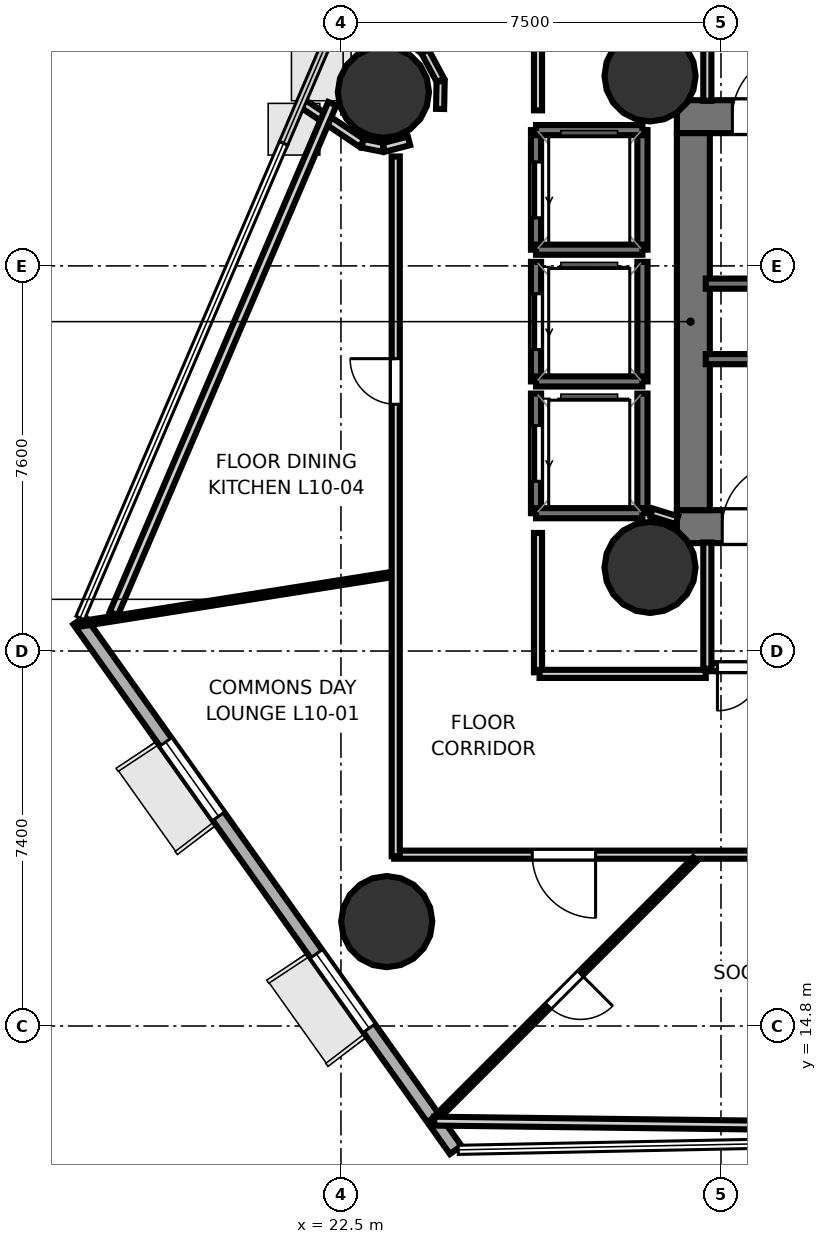
"""IFC4 building model, lengths in metres.
Left out: names, types, materials, properties, quantities, classifications, styles, units other than length and angle.
Written with IfcOpenShell. Run it as: python <this file> out.ifc"""

import sys

from ifc_helpers import new_model, si_unit, direction, frame, frame_2d, origin, origin_2d, place, context, subcontext, project, spatial, rectangle, hollow_circle, extrude, element, fill, save


model = new_model("IFC4")
c1 = context("Model", 3, precision=1e-05, world=origin(), true_north=direction((0.0, 1.0)))
c2 = subcontext(c1, "Body", "Model", "MODEL_VIEW")
j1 = project(units=[si_unit("LENGTHUNIT", "METRE"), si_unit("PLANEANGLEUNIT", "RADIAN")], contexts=[c1])
p1 = place(None, origin())
s1 = spatial("IfcSite", under=j1, at=p1, CompositionType="ELEMENT")
p2 = place(p1, origin())
s2 = spatial("IfcBuilding", under=s1, at=p2, CompositionType="ELEMENT")
p3 = place(p2, frame((0.0, 0.0, 44.2)))
s3 = spatial("IfcBuildingStorey", under=s2, at=p3, CompositionType="ELEMENT", Elevation=44.2)
p4 = place(p3, frame((29.13, 32.745, 0.0), z_axis=(0.0, 0.0, 1.0), x_axis=(1.0, 0.0, 0.0)))
e1 = element("IfcWall", 1, at=p4, inside=s3, PredefinedType="SHEAR", context=c2, shape_type="SweptSolid", body=[
    extrude(rectangle(XDim=10.72, YDim=0.65, at=frame_2d((5.36, 0.0))), origin(), (0.0, 0.0, 1.0), 3.4),
])
p5 = place(p4, frame((1.095, 0.0, 0.0)))
e2 = element("IfcOpeningElement", 2, at=p5, cuts=e1, PredefinedType="OPENING", context=c2, shape_type="SweptSolid", body=[
    extrude(rectangle(XDim=1.25, YDim=2.15, at=frame_2d((0.625, 1.075))), frame((0.0, 0.335, 0.0), z_axis=(0.0, -1.0, 0.0), x_axis=(1.0, 0.0, 0.0)), (0.0, 0.0, 1.0), 0.67),
])
p6 = place(p3, frame((29.13, 24.655, 0.0), z_axis=(0.0, 0.0, 1.0), x_axis=(1.0, 0.0, 0.0)))
e3 = element("IfcWall", 3, at=p6, inside=s3, PredefinedType="SHEAR", context=c2, shape_type="SweptSolid", body=[
    extrude(rectangle(XDim=10.72, YDim=0.65, at=frame_2d((5.36, 0.0))), origin(), (0.0, 0.0, 1.0), 3.4),
])
p7 = place(p6, frame((0.895, 0.0, 0.0)))
e4 = element("IfcOpeningElement", 4, at=p7, cuts=e3, PredefinedType="OPENING", context=c2, shape_type="SweptSolid", body=[
    extrude(rectangle(XDim=1.25, YDim=2.15, at=frame_2d((0.625, 1.075))), frame((0.0, 0.335, 0.0), z_axis=(0.0, -1.0, 0.0), x_axis=(1.0, 0.0, 0.0)), (0.0, 0.0, 1.0), 0.67),
])
p8 = place(p3, frame((29.455, 24.98, 0.0), z_axis=(0.0, 0.0, 1.0), x_axis=(0.0, 1.0, 0.0)))
e5 = element("IfcWall", 5, at=p8, inside=s3, PredefinedType="SHEAR", context=c2, shape_type="SweptSolid", body=[
    extrude(rectangle(XDim=7.44, YDim=0.65, at=frame_2d((3.72, 0.0))), origin(), (0.0, 0.0, 1.0), 3.4),
])
for number, where, z_axis, x_axis in (
    (6, (28.6, 33.55, 0.0), (0.0, 0.0, 1.0), (1.0, 0.0, 0.0)),
    (7, (28.6, 23.85, 0.0), (0.0, 0.0, 1.0), (1.0, 0.0, 0.0)),
    (8, (23.338, 33.228, 0.0), (0.0, 0.0, 1.0), (1.0, 0.0, 0.0)),
    (9, (23.404, 16.86, 0.0), (0.0, 0.0, 1.0), (1.0, 0.0, 0.0)),
):
    element("IfcColumn", number, at=place(p3, frame(where, z_axis=z_axis, x_axis=x_axis)), inside=s3, PredefinedType="COLUMN", context=c2, shape_type="SweptSolid", body=[
        extrude(hollow_circle(Radius=0.9, WallThickness=0.045, at=origin_2d()), origin(), (0.0, 0.0, 1.0), 3.7),
    ])
p9 = place(p3, frame((17.333, 22.807, 0.0), z_axis=(0.0, 0.0, 1.0), x_axis=(0.579477425236, -0.814988290494, 0.0)))
e10 = element("IfcWall", 10, at=p9, inside=s3, PredefinedType="SOLIDWALL", context=c2, shape_type="SweptSolid", body=[
    extrude(rectangle(XDim=12.824, YDim=0.28, at=frame_2d((6.412, 0.0))), origin(), (0.0, 0.0, 1.0), 3.4),
])
p10 = place(p9, frame((2.947, 0.0, 0.85)))
e11 = element("IfcOpeningElement", 11, at=p10, cuts=e10, PredefinedType="OPENING", context=c2, shape_type="SweptSolid", body=[
    extrude(rectangle(XDim=1.8, YDim=2.1, at=frame_2d((0.9, 1.05))), frame((0.0, 0.15, 0.0), z_axis=(0.0, -1.0, 0.0), x_axis=(1.0, 0.0, 0.0)), (0.0, 0.0, 1.0), 0.3),
])
p11 = place(p9, frame((8.077, 0.0, 0.85)))
e12 = element("IfcOpeningElement", 12, at=p11, cuts=e10, PredefinedType="OPENING", context=c2, shape_type="SweptSolid", body=[
    extrude(rectangle(XDim=1.8, YDim=2.1, at=frame_2d((0.9, 1.05))), frame((0.0, 0.15, 0.0), z_axis=(0.0, -1.0, 0.0), x_axis=(1.0, 0.0, 0.0)), (0.0, 0.0, 1.0), 0.3),
])
p12 = place(p3, frame((29.7, 29.45, 0.0), z_axis=(0.0, 0.0, 1.0), x_axis=(1.0, 0.0, 0.0)))
e13 = element("IfcWall", 13, at=p12, inside=s3, PredefinedType="SOLIDWALL", context=c2, shape_type="SweptSolid", body=[
    extrude(rectangle(XDim=8.3, YDim=0.2, at=frame_2d((4.15, 0.0))), origin(), (0.0, 0.0, 1.0), 3.4),
])
p13 = place(p3, frame((29.7, 27.96, 0.0), z_axis=(0.0, 0.0, 1.0), x_axis=(1.0, 0.0, 0.0)))
e14 = element("IfcWall", 14, at=p13, inside=s3, PredefinedType="SOLIDWALL", context=c2, shape_type="SweptSolid", body=[
    extrude(rectangle(XDim=7.75, YDim=0.2, at=frame_2d((3.875, 0.0))), origin(), (0.0, 0.0, 1.0), 3.4),
])
p14 = place(p3, frame((28.45, 30.12, 0.0), z_axis=(0.0, 0.0, 1.0), x_axis=(0.0, 1.0, 0.0)))
e15 = element("IfcWall", 15, at=p14, inside=s3, PredefinedType="SOLIDWALL", context=c2, shape_type="SweptSolid", body=[
    extrude(rectangle(XDim=2.36, YDim=0.2, at=frame_2d((1.18, 0.0))), origin(), (0.0, 0.0, 1.0), 3.4),
])
p15 = place(p3, frame((26.35, 30.12, 0.0), z_axis=(0.0, 0.0, 1.0), x_axis=(0.0, 1.0, 0.0)))
e16 = element("IfcWall", 16, at=p15, inside=s3, PredefinedType="SOLIDWALL", context=c2, shape_type="SweptSolid", body=[
    extrude(rectangle(XDim=2.36, YDim=0.2, at=frame_2d((1.18, 0.0))), origin(), (0.0, 0.0, 1.0), 3.4),
])
p16 = place(p15, frame((0.63, 0.0, 0.0)))
e17 = element("IfcOpeningElement", 17, at=p16, cuts=e16, PredefinedType="OPENING", context=c2, shape_type="SweptSolid", body=[
    extrude(rectangle(XDim=1.1, YDim=2.15, at=frame_2d((0.55, 1.075))), frame((0.0, 0.11, 0.0), z_axis=(0.0, -1.0, 0.0), x_axis=(1.0, 0.0, 0.0)), (0.0, 0.0, 1.0), 0.22),
])
for number, where, z_axis, x_axis in (
    (18, (26.35, 32.48, 0.0), (0.0, 0.0, 1.0), (1.0, 0.0, 0.0)),
    (19, (26.35, 30.12, 0.0), (0.0, 0.0, 1.0), (1.0, 0.0, 0.0)),
):
    element("IfcWall", number, at=place(p3, frame(where, z_axis=z_axis, x_axis=x_axis)), inside=s3, PredefinedType="SOLIDWALL", context=c2, shape_type="SweptSolid", body=[
        extrude(rectangle(XDim=2.1, YDim=0.2, at=frame_2d((1.05, 0.0))), origin(), (0.0, 0.0, 1.0), 3.4),
    ])
p17 = place(p3, frame((28.45, 27.52, 0.0), z_axis=(0.0, 0.0, 1.0), x_axis=(0.0, 1.0, 0.0)))
e20 = element("IfcWall", 20, at=p17, inside=s3, PredefinedType="SOLIDWALL", context=c2, shape_type="SweptSolid", body=[
    extrude(rectangle(XDim=2.36, YDim=0.2, at=frame_2d((1.18, 0.0))), origin(), (0.0, 0.0, 1.0), 3.4),
])
p18 = place(p3, frame((26.35, 27.52, 0.0), z_axis=(0.0, 0.0, 1.0), x_axis=(0.0, 1.0, 0.0)))
e21 = element("IfcWall", 21, at=p18, inside=s3, PredefinedType="SOLIDWALL", context=c2, shape_type="SweptSolid", body=[
    extrude(rectangle(XDim=2.36, YDim=0.2, at=frame_2d((1.18, 0.0))), origin(), (0.0, 0.0, 1.0), 3.4),
])
p19 = place(p18, frame((0.63, 0.0, 0.0)))
e22 = element("IfcOpeningElement", 22, at=p19, cuts=e21, PredefinedType="OPENING", context=c2, shape_type="SweptSolid", body=[
    extrude(rectangle(XDim=1.1, YDim=2.15, at=frame_2d((0.55, 1.075))), frame((0.0, 0.11, 0.0), z_axis=(0.0, -1.0, 0.0), x_axis=(1.0, 0.0, 0.0)), (0.0, 0.0, 1.0), 0.22),
])
p20 = place(p3, frame((26.35, 27.52, 0.0), z_axis=(0.0, 0.0, 1.0), x_axis=(1.0, 0.0, 0.0)))
e23 = element("IfcWall", 23, at=p20, inside=s3, PredefinedType="SOLIDWALL", context=c2, shape_type="SweptSolid", body=[
    extrude(rectangle(XDim=2.1, YDim=0.2, at=frame_2d((1.05, 0.0))), origin(), (0.0, 0.0, 1.0), 3.4),
])
p21 = place(p3, frame((28.45, 24.92, 0.0), z_axis=(0.0, 0.0, 1.0), x_axis=(0.0, 1.0, 0.0)))
e24 = element("IfcWall", 24, at=p21, inside=s3, PredefinedType="SOLIDWALL", context=c2, shape_type="SweptSolid", body=[
    extrude(rectangle(XDim=2.36, YDim=0.2, at=frame_2d((1.18, 0.0))), origin(), (0.0, 0.0, 1.0), 3.4),
])
p22 = place(p3, frame((26.35, 24.92, 0.0), z_axis=(0.0, 0.0, 1.0), x_axis=(0.0, 1.0, 0.0)))
e25 = element("IfcWall", 25, at=p22, inside=s3, PredefinedType="SOLIDWALL", context=c2, shape_type="SweptSolid", body=[
    extrude(rectangle(XDim=2.36, YDim=0.2, at=frame_2d((1.18, 0.0))), origin(), (0.0, 0.0, 1.0), 3.4),
])
p23 = place(p22, frame((0.63, 0.0, 0.0)))
e26 = element("IfcOpeningElement", 26, at=p23, cuts=e25, PredefinedType="OPENING", context=c2, shape_type="SweptSolid", body=[
    extrude(rectangle(XDim=1.1, YDim=2.15, at=frame_2d((0.55, 1.075))), frame((0.0, 0.11, 0.0), z_axis=(0.0, -1.0, 0.0), x_axis=(1.0, 0.0, 0.0)), (0.0, 0.0, 1.0), 0.22),
])
p24 = place(p3, frame((26.35, 24.92, 0.0), z_axis=(0.0, 0.0, 1.0), x_axis=(1.0, 0.0, 0.0)))
e27 = element("IfcWall", 27, at=p24, inside=s3, PredefinedType="SOLIDWALL", context=c2, shape_type="SweptSolid", body=[
    extrude(rectangle(XDim=2.1, YDim=0.2, at=frame_2d((1.05, 0.0))), origin(), (0.0, 0.0, 1.0), 3.4),
])
p25 = place(p3, frame((29.731, 33.058, 0.0), z_axis=(0.0, 0.0, 1.0), x_axis=(0.0, 1.0, 0.0)))
e28 = element("IfcWall", 28, at=p25, inside=s3, PredefinedType="PARTITIONING", context=c2, shape_type="SweptSolid", body=[
    extrude(rectangle(XDim=2.462, YDim=0.16, at=frame_2d((1.231, 0.0))), origin(), (0.0, 0.0, 1.0), 2.72),
])
p26 = place(p3, frame((33.45, 21.881, 0.0), z_axis=(0.0, 0.0, 1.0), x_axis=(-1.0, 0.0, 0.0)))
e29 = element("IfcWall", 29, at=p26, inside=s3, PredefinedType="PARTITIONING", context=c2, shape_type="SweptSolid", body=[
    extrude(rectangle(XDim=3.75, YDim=0.16, at=frame_2d((1.875, 0.0))), origin(), (0.0, 0.0, 1.0), 2.72),
])
p27 = place(p26, frame((1.275, 0.0, 0.0)))
e30 = element("IfcOpeningElement", 30, at=p27, cuts=e29, PredefinedType="OPENING", context=c2, shape_type="SweptSolid", body=[
    extrude(rectangle(XDim=1.2, YDim=2.15, at=frame_2d((0.6, 1.075))), frame((0.0, 0.09, 0.0), z_axis=(0.0, -1.0, 0.0), x_axis=(1.0, 0.0, 0.0)), (0.0, 0.0, 1.0), 0.18),
])
p28 = place(p26, frame((2.66, 0.0, 0.0)))
e31 = element("IfcOpeningElement", 31, at=p28, cuts=e29, PredefinedType="OPENING", context=c2, shape_type="SweptSolid", body=[
    extrude(rectangle(XDim=0.86, YDim=2.05, at=frame_2d((0.43, 1.025))), frame((0.0, 0.09, 0.0), z_axis=(0.0, -1.0, 0.0), x_axis=(1.0, 0.0, 0.0)), (0.0, 0.0, 1.0), 0.18),
])
p29 = place(p3, frame((29.731, 21.85, 0.0), z_axis=(0.0, 0.0, 1.0), x_axis=(0.0, 1.0, 0.0)))
e32 = element("IfcWall", 32, at=p29, inside=s3, PredefinedType="PARTITIONING", context=c2, shape_type="SweptSolid", body=[
    extrude(rectangle(XDim=2.492, YDim=0.16, at=frame_2d((1.246, 0.0))), origin(), (0.0, 0.0, 1.0), 2.72),
])
p30 = place(p3, frame((29.13, 24.782, 0.0), z_axis=(0.0, 0.0, 1.0), x_axis=(-0.955000482512, 0.296604245422, 0.0)))
e33 = element("IfcWall", 33, at=p30, inside=s3, PredefinedType="PARTITIONING", context=c2, shape_type="SweptSolid", body=[
    extrude(rectangle(XDim=0.524, YDim=0.16, at=frame_2d((0.262, 0.0))), origin(), (0.0, 0.0, 1.0), 2.72),
])
p31 = place(p3, frame((24.464, 33.461, 0.0), z_axis=(0.0, 0.0, 1.0), x_axis=(-0.4715232649, 0.881853622014, 0.0)))
e34 = element("IfcWall", 34, at=p31, inside=s3, PredefinedType="PARTITIONING", context=c2, shape_type="SweptSolid", body=[
    extrude(rectangle(XDim=0.65, YDim=0.16, at=frame_2d((0.325, 0.0))), origin(), (0.0, 0.0, 1.0), 2.678),
])
p32 = place(p3, frame((24.15, 34.044, 0.0), z_axis=(0.0, 0.0, 1.0), x_axis=(-0.773051152653, 0.634343688691, 0.0)))
e35 = element("IfcWall", 35, at=p32, inside=s3, PredefinedType="PARTITIONING", context=c2, shape_type="SweptSolid", body=[
    extrude(rectangle(XDim=1.934, YDim=0.16, at=frame_2d((0.967, 0.0))), origin(), (0.0, 0.0, 1.0), 2.678),
])
p33 = place(p3, frame((26.389, 35.58, 0.0), z_axis=(0.0, 0.0, 1.0), x_axis=(0.0, -1.0, 0.0)))
e36 = element("IfcWall", 36, at=p33, inside=s3, PredefinedType="PARTITIONING", context=c2, shape_type="SweptSolid", body=[
    extrude(rectangle(XDim=2.71, YDim=0.16, at=frame_2d((1.355, 0.0))), origin(), (0.0, 0.0, 1.0), 2.678),
])
p34 = place(p3, frame((26.389, 24.531, 0.0), z_axis=(0.0, 0.0, 1.0), x_axis=(0.0, -1.0, 0.0)))
e37 = element("IfcWall", 37, at=p34, inside=s3, PredefinedType="PARTITIONING", context=c2, shape_type="SweptSolid", body=[
    extrude(rectangle(XDim=2.75, YDim=0.16, at=frame_2d((1.375, 0.0))), origin(), (0.0, 0.0, 1.0), 2.72),
])
p35 = place(p3, frame((26.42, 21.749, 0.0), z_axis=(0.0, 0.0, 1.0), x_axis=(1.0, 0.0, 0.0)))
e38 = element("IfcWall", 38, at=p35, inside=s3, PredefinedType="PARTITIONING", context=c2, shape_type="SweptSolid", body=[
    extrude(rectangle(XDim=3.28, YDim=0.16, at=frame_2d((1.64, 0.0))), origin(), (0.0, 0.0, 1.0), 2.72),
])
p36 = place(p3, frame((33.32, 18.181, 0.0), z_axis=(0.0, 0.0, 1.0), x_axis=(-1.0, 0.0, 0.0)))
e39 = element("IfcWall", 39, at=p36, inside=s3, PredefinedType="PARTITIONING", context=c2, shape_type="SweptSolid", body=[
    extrude(rectangle(XDim=9.77, YDim=0.16, at=frame_2d((4.885, 0.0))), origin(), (0.0, 0.0, 1.0), 2.678),
])
p37 = place(p36, frame((5.794, 0.0, 0.0)))
e40 = element("IfcOpeningElement", 40, at=p37, cuts=e39, PredefinedType="OPENING", context=c2, shape_type="SweptSolid", body=[
    extrude(rectangle(XDim=1.25, YDim=2.2, at=frame_2d((0.625, 1.1))), frame((0.0, 0.09, 0.0), z_axis=(0.0, -1.0, 0.0), x_axis=(1.0, 0.0, 0.0)), (0.0, 0.0, 1.0), 0.18),
])
p38 = place(p3, frame((23.581, 18.15, 0.0), z_axis=(0.0, 0.0, 1.0), x_axis=(0.0, 1.0, 0.0)))
e41 = element("IfcWall", 41, at=p38, inside=s3, PredefinedType="PARTITIONING", context=c2, shape_type="SweptSolid", body=[
    extrude(rectangle(XDim=13.81, YDim=0.16, at=frame_2d((6.905, 0.0))), origin(), (0.0, 0.0, 1.0), 2.678),
])
p39 = place(p38, frame((8.919, 0.0, 0.0)))
e42 = element("IfcOpeningElement", 42, at=p39, cuts=e41, PredefinedType="OPENING", context=c2, shape_type="SweptSolid", body=[
    extrude(rectangle(XDim=0.9, YDim=2.1, at=frame_2d((0.45, 1.05))), frame((0.0, 0.09, 0.0), z_axis=(0.0, -1.0, 0.0), x_axis=(1.0, 0.0, 0.0)), (0.0, 0.0, 1.0), 0.18),
])
p40 = place(p3, frame((24.457, 32.897, 0.0), z_axis=(0.0, 0.0, 1.0), x_axis=(0.020031598679, 0.999799347396, 0.0)))
e43 = element("IfcWall", 43, at=p40, inside=s3, PredefinedType="PARTITIONING", context=c2, shape_type="SweptSolid", body=[
    extrude(rectangle(XDim=0.548, YDim=0.16, at=frame_2d((0.274, 0.0))), origin(), (0.0, 0.0, 1.0), 2.72),
])
p41 = place(p3, frame((17.361, 22.736, 0.0), z_axis=(0.0, 0.0, 1.0), x_axis=(0.987689944213, 0.156424339859, 0.0)))
e44 = element("IfcWall", 44, at=p41, inside=s3, PredefinedType="PARTITIONING", context=c2, shape_type="SweptSolid", body=[
    extrude(rectangle(XDim=6.19, YDim=0.105, at=frame_2d((3.095, 0.0))), origin(), (0.0, 0.0, 1.0), 2.678),
])
p42 = place(p3, frame((29.489, 18.092, 0.0), z_axis=(0.0, 0.0, 1.0), x_axis=(-0.707106781187, -0.707106781187, 0.0)))
e45 = element("IfcWall", 45, at=p42, inside=s3, PredefinedType="PARTITIONING", context=c2, shape_type="SweptSolid", body=[
    extrude(rectangle(XDim=7.296, YDim=0.105, at=frame_2d((3.648, 0.0))), origin(), (0.0, 0.0, 1.0), 2.678),
])
p43 = place(p42, frame((3.198, 0.0, 0.0)))
e46 = element("IfcOpeningElement", 46, at=p43, cuts=e45, PredefinedType="OPENING", context=c2, shape_type="SweptSolid", body=[
    extrude(rectangle(XDim=0.9, YDim=2.1, at=frame_2d((0.45, 1.05))), frame((0.0, 0.062, 0.0), z_axis=(0.0, -1.0, 0.0), x_axis=(1.0, 0.0, 0.0)), (0.0, 0.0, 1.0), 0.125),
])
p44 = place(p3, frame((21.696, 33.037, 0.0), z_axis=(0.0, 0.0, 1.0), x_axis=(0.831511757221, -0.555507153512, 0.0)))
e47 = element("IfcWall", 47, at=p44, inside=s3, PredefinedType="PLUMBINGWALL", context=c2, shape_type="SweptSolid", body=[
    extrude(rectangle(XDim=1.466, YDim=0.175, at=frame_2d((0.733, 0.0))), origin(), (0.0, 0.0, 1.0), 2.72),
])
p45 = place(p3, frame((22.926, 32.218, 0.0), z_axis=(0.0, 0.0, 1.0), x_axis=(0.980852113174, -0.194754029692, 0.0)))
e48 = element("IfcWall", 48, at=p45, inside=s3, PredefinedType="PLUMBINGWALL", context=c2, shape_type="SweptSolid", body=[
    extrude(rectangle(XDim=0.414, YDim=0.175, at=frame_2d((0.207, 0.0))), origin(), (0.0, 0.0, 1.0), 2.678),
])
p46 = place(p3, frame((23.346, 32.138, 0.0), z_axis=(0.0, 0.0, 1.0), x_axis=(0.967662659088, 0.252247850749, 0.0)))
e49 = element("IfcWall", 49, at=p46, inside=s3, PredefinedType="PLUMBINGWALL", context=c2, shape_type="SweptSolid", body=[
    extrude(rectangle(XDim=0.514, YDim=0.175, at=frame_2d((0.257, 0.0))), origin(), (0.0, 0.0, 1.0), 2.678),
])
p47 = place(p3, frame((18.017, 22.94, 0.0), z_axis=(0.0, 0.0, 1.0), x_axis=(0.393932757069, 0.919139261977, 0.0)))
e50 = element("IfcWall", 50, at=p47, inside=s3, PredefinedType="PLUMBINGWALL", context=c2, shape_type="SweptSolid", body=[
    extrude(rectangle(XDim=10.947, YDim=0.175, at=frame_2d((5.473, 0.0))), origin(), (0.0, 0.0, 1.0), 2.72),
])
p48 = place(p3, frame((34.751, 12.796, 0.0), z_axis=(0.0, 0.0, 1.0), x_axis=(-0.99992593693, 0.012170482898, 0.0)))
e51 = element("IfcWall", 51, at=p48, inside=s3, PredefinedType="PLUMBINGWALL", context=c2, shape_type="SweptSolid", body=[
    extrude(rectangle(XDim=10.411, YDim=0.175, at=frame_2d((5.206, 0.0))), origin(), (0.0, 0.0, 1.0), 2.72),
])
p49 = place(p5, origin())
e52 = element("IfcDoor", 52, at=p49, inside=s3, OperationType="SINGLE_SWING_RIGHT", PredefinedType="DOOR", context=c2, shape_type="SweptSolid", body=[
    extrude(rectangle(XDim=1.25, YDim=2.15, at=frame_2d((0.625, 1.075))), frame((0.0, 0.025, 0.0), z_axis=(0.0, -1.0, 0.0), x_axis=(1.0, 0.0, 0.0)), (0.0, 0.0, 1.0), 0.05),
])
fill(e2, e52)
p50 = place(p7, origin())
e53 = element("IfcDoor", 53, at=p50, inside=s3, OperationType="SINGLE_SWING_RIGHT", PredefinedType="DOOR", context=c2, shape_type="SweptSolid", body=[
    extrude(rectangle(XDim=1.25, YDim=2.15, at=frame_2d((0.625, 1.075))), frame((0.0, 0.025, 0.0), z_axis=(0.0, -1.0, 0.0), x_axis=(1.0, 0.0, 0.0)), (0.0, 0.0, 1.0), 0.05),
])
fill(e4, e53)
p51 = place(p16, origin())
e54 = element("IfcDoor", 54, at=p51, inside=s3, OperationType="SLIDING_TO_LEFT", PredefinedType="DOOR", context=c2, shape_type="SweptSolid", body=[
    extrude(rectangle(XDim=1.1, YDim=2.15, at=frame_2d((0.55, 1.075))), frame((0.0, 0.025, 0.0), z_axis=(0.0, -1.0, 0.0), x_axis=(1.0, 0.0, 0.0)), (0.0, 0.0, 1.0), 0.05),
])
fill(e17, e54)
p52 = place(p19, origin())
e55 = element("IfcDoor", 55, at=p52, inside=s3, OperationType="SLIDING_TO_LEFT", PredefinedType="DOOR", context=c2, shape_type="SweptSolid", body=[
    extrude(rectangle(XDim=1.1, YDim=2.15, at=frame_2d((0.55, 1.075))), frame((0.0, 0.025, 0.0), z_axis=(0.0, -1.0, 0.0), x_axis=(1.0, 0.0, 0.0)), (0.0, 0.0, 1.0), 0.05),
])
fill(e22, e55)
p53 = place(p23, origin())
e56 = element("IfcDoor", 56, at=p53, inside=s3, OperationType="SLIDING_TO_LEFT", PredefinedType="DOOR", context=c2, shape_type="SweptSolid", body=[
    extrude(rectangle(XDim=1.1, YDim=2.15, at=frame_2d((0.55, 1.075))), frame((0.0, 0.025, 0.0), z_axis=(0.0, -1.0, 0.0), x_axis=(1.0, 0.0, 0.0)), (0.0, 0.0, 1.0), 0.05),
])
fill(e26, e56)
p54 = place(p28, origin())
e57 = element("IfcDoor", 57, at=p54, inside=s3, OperationType="SINGLE_SWING_RIGHT", PredefinedType="DOOR", context=c2, shape_type="SweptSolid", body=[
    extrude(rectangle(XDim=0.86, YDim=2.05, at=frame_2d((0.43, 1.025))), frame((0.0, 0.025, 0.0), z_axis=(0.0, -1.0, 0.0), x_axis=(1.0, 0.0, 0.0)), (0.0, 0.0, 1.0), 0.05),
])
fill(e31, e57)
p55 = place(p37, origin())
e58 = element("IfcDoor", 58, at=p55, inside=s3, OperationType="SINGLE_SWING_LEFT", PredefinedType="DOOR", context=c2, shape_type="SweptSolid", body=[
    extrude(rectangle(XDim=1.25, YDim=2.2, at=frame_2d((0.625, 1.1))), frame((0.0, 0.025, 0.0), z_axis=(0.0, -1.0, 0.0), x_axis=(1.0, 0.0, 0.0)), (0.0, 0.0, 1.0), 0.05),
])
fill(e40, e58)
p56 = place(p39, origin())
e59 = element("IfcDoor", 59, at=p56, inside=s3, OperationType="SINGLE_SWING_RIGHT", PredefinedType="DOOR", context=c2, shape_type="SweptSolid", body=[
    extrude(rectangle(XDim=0.9, YDim=2.1, at=frame_2d((0.45, 1.05))), frame((0.0, 0.025, 0.0), z_axis=(0.0, -1.0, 0.0), x_axis=(1.0, 0.0, 0.0)), (0.0, 0.0, 1.0), 0.05),
])
fill(e42, e59)
p57 = place(p43, origin())
e60 = element("IfcDoor", 60, at=p57, inside=s3, OperationType="SINGLE_SWING_LEFT", PredefinedType="DOOR", context=c2, shape_type="SweptSolid", body=[
    extrude(rectangle(XDim=0.9, YDim=2.1, at=frame_2d((0.45, 1.05))), frame((0.0, 0.025, 0.0), z_axis=(0.0, -1.0, 0.0), x_axis=(1.0, 0.0, 0.0)), (0.0, 0.0, 1.0), 0.05),
])
fill(e46, e60)
p58 = place(p10, origin())
e61 = element("IfcWindow", 61, at=p58, inside=s3, PartitioningType="SINGLE_PANEL", PredefinedType="WINDOW", context=c2, shape_type="SweptSolid", body=[
    extrude(rectangle(XDim=1.8, YDim=2.1, at=frame_2d((0.9, 1.05))), frame((0.0, 0.03, 0.0), z_axis=(0.0, -1.0, 0.0), x_axis=(1.0, 0.0, 0.0)), (0.0, 0.0, 1.0), 0.06),
])
fill(e11, e61)
p59 = place(p11, origin())
e62 = element("IfcWindow", 62, at=p59, inside=s3, PartitioningType="SINGLE_PANEL", PredefinedType="WINDOW", context=c2, shape_type="SweptSolid", body=[
    extrude(rectangle(XDim=1.8, YDim=2.1, at=frame_2d((0.9, 1.05))), frame((0.0, 0.03, 0.0), z_axis=(0.0, -1.0, 0.0), x_axis=(1.0, 0.0, 0.0)), (0.0, 0.0, 1.0), 0.06),
])
fill(e12, e62)
save(model, sys.argv[1])
